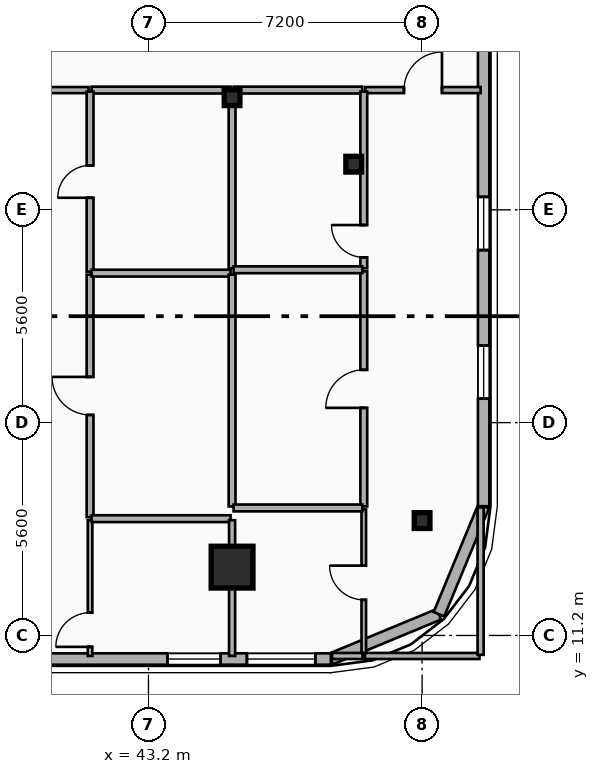
"""IFC4 building model, lengths in metres.
Left out: names, types, materials, properties, quantities, classifications, styles, units other than length and angle.
Written with IfcOpenShell. Run it as: python <this file> out.ifc"""

import sys

from ifc_helpers import new_model, si_unit, direction, frame, frame_2d, origin, origin_2d, place, context, subcontext, project, spatial, rectangle, i_section, extrude, element, fill, save


model = new_model("IFC4")
c1 = context("Model", 3, precision=1e-05, world=origin(), true_north=direction((0.0, 1.0)))
c2 = subcontext(c1, "Body", "Model", "MODEL_VIEW")
j1 = project(units=[si_unit("LENGTHUNIT", "METRE"), si_unit("PLANEANGLEUNIT", "RADIAN")], contexts=[c1])
p1 = place(None, origin())
s1 = spatial("IfcSite", under=j1, at=p1, CompositionType="ELEMENT")
p2 = place(p1, origin())
s2 = spatial("IfcBuilding", under=s1, at=p2, CompositionType="ELEMENT")
p3 = place(p2, frame((0.0, 0.0, 144.8)))
s3 = spatial("IfcBuildingStorey", under=s2, at=p3, CompositionType="ELEMENT", Elevation=144.8)
p4 = place(p3, frame((45.4, 25.35, 0.0), z_axis=(0.0, 0.0, 1.0), x_axis=(1.0, 0.0, 0.0)))
e1 = element("IfcColumn", 1, at=p4, inside=s3, PredefinedType="COLUMN", context=c2, shape_type="SweptSolid", body=[
    extrude(i_section(OverallWidth=0.413, OverallDepth=0.415, WebThickness=0.03, FlangeThickness=0.047, FilletRadius=0.015, at=origin_2d()), origin(), (0.0, 0.0, 1.0), 3.55),
])
p5 = place(p3, frame((45.4, 13.106, 0.0), z_axis=(0.0, -0.0902702026, 0.995917311087), x_axis=(1.0, 0.0, 0.0)))
e2 = element("IfcColumn", 2, at=p5, inside=s3, PredefinedType="COLUMN", context=c2, shape_type="SweptSolid", body=[
    extrude(rectangle(XDim=1.1, YDim=1.1, at=origin_2d()), origin(), (0.0, 0.0, 1.0), 3.565),
])
p6 = place(p3, frame((48.6, 23.6, 0.0), z_axis=(0.0, 0.0, 1.0), x_axis=(1.0, 0.0, 0.0)))
e3 = element("IfcColumn", 3, at=p6, inside=s3, PredefinedType="COLUMN", context=c2, shape_type="SweptSolid", body=[
    extrude(i_section(OverallWidth=0.413, OverallDepth=0.415, WebThickness=0.03, FlangeThickness=0.047, FilletRadius=0.015, at=origin_2d()), origin(), (0.0, 0.0, 1.0), 3.55),
])
p7 = place(p3, frame((50.4, 14.319, 0.0), z_axis=(0.0, -0.079862380324, 0.996805898964), x_axis=(1.0, 0.0, 0.0)))
e4 = element("IfcColumn", 4, at=p7, inside=s3, PredefinedType="COLUMN", context=c2, shape_type="SweptSolid", body=[
    extrude(i_section(OverallWidth=0.413, OverallDepth=0.415, WebThickness=0.03, FlangeThickness=0.047, FilletRadius=0.015, at=origin_2d()), origin(), (0.0, 0.0, 1.0), 3.562),
])
p8 = place(p3, frame((50.843, 11.757, 0.0), z_axis=(0.0, 0.0, 1.0), x_axis=(-0.92389884758, -0.382636798336, 0.0)))
e5 = element("IfcWall", 5, at=p8, inside=s3, PredefinedType="SOLIDWALL", context=c2, shape_type="SweptSolid", body=[
    extrude(rectangle(XDim=3.077, YDim=0.3, at=frame_2d((1.538, 0.0))), origin(), (0.0, 0.0, 1.0), 3.29),
])
p9 = place(p3, frame((52.02, 14.6, 0.0), z_axis=(0.0, 0.0, 1.0), x_axis=(-0.382676475685, -0.923882414032, 0.0)))
e6 = element("IfcWall", 6, at=p9, inside=s3, PredefinedType="SOLIDWALL", context=c2, shape_type="SweptSolid", body=[
    extrude(rectangle(XDim=3.077, YDim=0.3, at=frame_2d((1.539, 0.0))), origin(), (0.0, 0.0, 1.0), 3.29),
])
p10 = place(p3, frame((52.02, 37.6, 0.0), z_axis=(0.0, 0.0, 1.0), x_axis=(0.0, -1.0, 0.0)))
e7 = element("IfcWall", 7, at=p10, inside=s3, PredefinedType="SOLIDWALL", context=c2, shape_type="SweptSolid", body=[
    extrude(rectangle(XDim=23.0, YDim=0.3, at=frame_2d((11.5, 0.0))), origin(), (0.0, 0.0, 1.0), 3.29),
])
p11 = place(p10, frame((2.513, 0.0, 0.34)))
e8 = element("IfcOpeningElement", 8, at=p11, cuts=e7, PredefinedType="OPENING", context=c2, shape_type="SweptSolid", body=[
    extrude(rectangle(XDim=1.4, YDim=2.1, at=frame_2d((0.7, 1.05))), frame((0.0, 0.16, 0.0), z_axis=(0.0, -1.0, 0.0), x_axis=(1.0, 0.0, 0.0)), (0.0, 0.0, 1.0), 0.32),
])
p12 = place(p10, frame((6.107, 0.0, 0.34)))
e9 = element("IfcOpeningElement", 9, at=p12, cuts=e7, PredefinedType="OPENING", context=c2, shape_type="SweptSolid", body=[
    extrude(rectangle(XDim=1.4, YDim=2.1, at=frame_2d((0.7, 1.05))), frame((0.0, 0.16, 0.0), z_axis=(0.0, -1.0, 0.0), x_axis=(1.0, 0.0, 0.0)), (0.0, 0.0, 1.0), 0.32),
])
p13 = place(p10, frame((14.86, 0.0, 0.34)))
e10 = element("IfcOpeningElement", 10, at=p13, cuts=e7, PredefinedType="OPENING", context=c2, shape_type="SweptSolid", body=[
    extrude(rectangle(XDim=1.4, YDim=2.1, at=frame_2d((0.7, 1.05))), frame((0.0, 0.16, 0.0), z_axis=(0.0, -1.0, 0.0), x_axis=(1.0, 0.0, 0.0)), (0.0, 0.0, 1.0), 0.32),
])
p14 = place(p10, frame((18.77, 0.0, 0.34)))
e11 = element("IfcOpeningElement", 11, at=p14, cuts=e7, PredefinedType="OPENING", context=c2, shape_type="SweptSolid", body=[
    extrude(rectangle(XDim=1.4, YDim=2.1, at=frame_2d((0.7, 1.05))), frame((0.0, 0.16, 0.0), z_axis=(0.0, -1.0, 0.0), x_axis=(1.0, 0.0, 0.0)), (0.0, 0.0, 1.0), 0.32),
])
p15 = place(p3, frame((48.0, 10.58, 0.0), z_axis=(0.0, 0.0, 1.0), x_axis=(-1.0, 0.0, 0.0)))
e12 = element("IfcWall", 12, at=p15, inside=s3, PredefinedType="SOLIDWALL", context=c2, shape_type="SweptSolid", body=[
    extrude(rectangle(XDim=38.4, YDim=0.3, at=frame_2d((19.2, 0.0))), origin(), (0.0, 0.0, 1.0), 3.29),
])
p16 = place(p15, frame((36.19, 0.0, 0.34)))
e13 = element("IfcOpeningElement", 13, at=p16, cuts=e12, PredefinedType="OPENING", context=c2, shape_type="SweptSolid", body=[
    extrude(rectangle(XDim=1.8, YDim=1.8, at=frame_2d((0.9, 0.9))), frame((0.0, 0.16, 0.0), z_axis=(0.0, -1.0, 0.0), x_axis=(1.0, 0.0, 0.0)), (0.0, 0.0, 1.0), 0.32),
])
p17 = place(p15, frame((27.938, 0.0, 0.34)))
e14 = element("IfcOpeningElement", 14, at=p17, cuts=e12, PredefinedType="OPENING", context=c2, shape_type="SweptSolid", body=[
    extrude(rectangle(XDim=1.2, YDim=1.5, at=frame_2d((0.6, 0.75))), frame((0.0, 0.16, 0.0), z_axis=(0.0, -1.0, 0.0), x_axis=(1.0, 0.0, 0.0)), (0.0, 0.0, 1.0), 0.32),
])
p18 = place(p15, frame((25.719, 0.0, 0.34)))
e15 = element("IfcOpeningElement", 15, at=p18, cuts=e12, PredefinedType="OPENING", context=c2, shape_type="SweptSolid", body=[
    extrude(rectangle(XDim=1.4, YDim=1.8, at=frame_2d((0.7, 0.9))), frame((0.0, 0.16, 0.0), z_axis=(0.0, -1.0, 0.0), x_axis=(1.0, 0.0, 0.0)), (0.0, 0.0, 1.0), 0.32),
])
p19 = place(p15, frame((33.861, 0.0, 1.22)))
e16 = element("IfcOpeningElement", 16, at=p19, cuts=e12, PredefinedType="OPENING", context=c2, shape_type="SweptSolid", body=[
    extrude(rectangle(XDim=1.2, YDim=1.5, at=frame_2d((0.6, 0.75))), frame((0.0, 0.16, 0.0), z_axis=(0.0, -1.0, 0.0), x_axis=(1.0, 0.0, 0.0)), (0.0, 0.0, 1.0), 0.32),
])
p20 = place(p15, frame((20.1, 0.0, 0.65)))
e17 = element("IfcOpeningElement", 17, at=p20, cuts=e12, PredefinedType="OPENING", context=c2, shape_type="SweptSolid", body=[
    extrude(rectangle(XDim=2.1, YDim=2.1, at=frame_2d((1.05, 1.05))), frame((0.0, 0.16, 0.0), z_axis=(0.0, -1.0, 0.0), x_axis=(1.0, 0.0, 0.0)), (0.0, 0.0, 1.0), 0.32),
])
p21 = place(p15, frame((22.95, 0.0, 0.8)))
e18 = element("IfcOpeningElement", 18, at=p21, cuts=e12, PredefinedType="OPENING", context=c2, shape_type="SweptSolid", body=[
    extrude(rectangle(XDim=1.8, YDim=1.8, at=frame_2d((0.9, 0.9))), frame((0.0, 0.16, 0.0), z_axis=(0.0, -1.0, 0.0), x_axis=(1.0, 0.0, 0.0)), (0.0, 0.0, 1.0), 0.32),
])
p22 = place(p15, frame((13.35, 0.0, 0.65)))
e19 = element("IfcOpeningElement", 19, at=p22, cuts=e12, PredefinedType="OPENING", context=c2, shape_type="SweptSolid", body=[
    extrude(rectangle(XDim=2.1, YDim=2.1, at=frame_2d((1.05, 1.05))), frame((0.0, 0.16, 0.0), z_axis=(0.0, -1.0, 0.0), x_axis=(1.0, 0.0, 0.0)), (0.0, 0.0, 1.0), 0.32),
])
p23 = place(p15, frame((8.25, 0.0, 1.68)))
e20 = element("IfcOpeningElement", 20, at=p23, cuts=e12, PredefinedType="OPENING", context=c2, shape_type="SweptSolid", body=[
    extrude(rectangle(XDim=1.1, YDim=1.05, at=frame_2d((0.55, 0.525))), frame((0.0, 0.16, 0.0), z_axis=(0.0, -1.0, 0.0), x_axis=(1.0, 0.0, 0.0)), (0.0, 0.0, 1.0), 0.32),
])
p24 = place(p15, frame((2.9, 0.0, 0.34)))
e21 = element("IfcOpeningElement", 21, at=p24, cuts=e12, PredefinedType="OPENING", context=c2, shape_type="SweptSolid", body=[
    extrude(rectangle(XDim=1.4, YDim=1.8, at=frame_2d((0.7, 0.9))), frame((0.0, 0.16, 0.0), z_axis=(0.0, -1.0, 0.0), x_axis=(1.0, 0.0, 0.0)), (0.0, 0.0, 1.0), 0.32),
])
p25 = place(p15, frame((0.41, 0.0, 0.34)))
e22 = element("IfcOpeningElement", 22, at=p25, cuts=e12, PredefinedType="OPENING", context=c2, shape_type="SweptSolid", body=[
    extrude(rectangle(XDim=1.8, YDim=1.8, at=frame_2d((0.9, 0.9))), frame((0.0, 0.16, 0.0), z_axis=(0.0, -1.0, 0.0), x_axis=(1.0, 0.0, 0.0)), (0.0, 0.0, 1.0), 0.32),
])
p26 = place(p3, frame((38.39, 25.55, 0.0), z_axis=(0.0, 0.0, 1.0), x_axis=(1.0, 0.0, 0.0)))
e23 = element("IfcWall", 23, at=p26, inside=s3, PredefinedType="PARTITIONING", context=c2, shape_type="SweptSolid", body=[
    extrude(rectangle(XDim=3.233, YDim=0.16, at=frame_2d((1.617, 0.0))), origin(), (0.0, 0.0, 1.0), 3.29),
])
p27 = place(p26, frame((1.116, 0.0, 0.0)))
e24 = element("IfcOpeningElement", 24, at=p27, cuts=e23, PredefinedType="OPENING", context=c2, shape_type="SweptSolid", body=[
    extrude(rectangle(XDim=1.0, YDim=2.15, at=frame_2d((0.5, 1.075))), frame((0.0, 0.09, 0.0), z_axis=(0.0, -1.0, 0.0), x_axis=(1.0, 0.0, 0.0)), (0.0, 0.0, 1.0), 0.18),
])
p28 = place(p3, frame((41.703, 25.55, 0.0), z_axis=(0.0, 0.0, 1.0), x_axis=(1.0, 0.0, 0.0)))
e25 = element("IfcWall", 25, at=p28, inside=s3, PredefinedType="PLUMBINGWALL", context=c2, shape_type="SweptSolid", body=[
    extrude(rectangle(XDim=3.657, YDim=0.18, at=frame_2d((1.829, 0.0))), origin(), (0.0, 0.0, 1.0), 2.36),
])
p29 = place(p3, frame((48.906, 25.55, 0.0), z_axis=(0.0, 0.0, 1.0), x_axis=(1.0, 0.0, 0.0)))
e26 = element("IfcWall", 26, at=p29, inside=s3, PredefinedType="PARTITIONING", context=c2, shape_type="SweptSolid", body=[
    extrude(rectangle(XDim=3.034, YDim=0.16, at=frame_2d((1.517, 0.0))), origin(), (0.0, 0.0, 1.0), 2.62),
])
p30 = place(p29, frame((1.017, 0.0, 0.0)))
e27 = element("IfcOpeningElement", 27, at=p30, cuts=e26, PredefinedType="OPENING", context=c2, shape_type="SweptSolid", body=[
    extrude(rectangle(XDim=1.0, YDim=2.15, at=frame_2d((0.5, 1.075))), frame((0.0, 0.09, 0.0), z_axis=(0.0, -1.0, 0.0), x_axis=(1.0, 0.0, 0.0)), (0.0, 0.0, 1.0), 0.18),
])
p31 = place(p3, frame((45.44, 25.55, 0.0), z_axis=(0.0, 0.0, 1.0), x_axis=(1.0, 0.0, 0.0)))
e28 = element("IfcWall", 28, at=p31, inside=s3, PredefinedType="PLUMBINGWALL", context=c2, shape_type="SweptSolid", body=[
    extrude(rectangle(XDim=3.386, YDim=0.18, at=frame_2d((1.693, 0.0))), origin(), (0.0, 0.0, 1.0), 2.36),
])
p32 = place(p3, frame((41.663, 10.66, 0.0), z_axis=(0.0, 0.0, 1.0), x_axis=(0.0, 1.0, 0.0)))
e29 = element("IfcWall", 29, at=p32, inside=s3, PredefinedType="PARTITIONING", context=c2, shape_type="SweptSolid", body=[
    extrude(rectangle(XDim=3.573, YDim=0.12, at=frame_2d((1.787, 0.0))), origin(), (0.0, 0.0, 1.0), 2.91),
])
p33 = place(p32, frame((0.24, 0.0, 0.0)))
e30 = element("IfcOpeningElement", 30, at=p33, cuts=e29, PredefinedType="OPENING", context=c2, shape_type="SweptSolid", body=[
    extrude(rectangle(XDim=0.9, YDim=2.1, at=frame_2d((0.45, 1.05))), frame((0.0, 0.07, 0.0), z_axis=(0.0, -1.0, 0.0), x_axis=(1.0, 0.0, 0.0)), (0.0, 0.0, 1.0), 0.14),
])
p34 = place(p3, frame((41.663, 14.313, 0.0), z_axis=(0.0, 0.0, 1.0), x_axis=(0.0, 1.0, 0.0)))
e31 = element("IfcWall", 31, at=p34, inside=s3, PredefinedType="PLUMBINGWALL", context=c2, shape_type="SweptSolid", body=[
    extrude(rectangle(XDim=6.38, YDim=0.18, at=frame_2d((3.19, 0.0))), origin(), (0.0, 0.0, 1.0), 2.72),
])
p35 = place(p34, frame((2.69, 0.0, 0.0)))
e32 = element("IfcOpeningElement", 32, at=p35, cuts=e31, PredefinedType="OPENING", context=c2, shape_type="SweptSolid", body=[
    extrude(rectangle(XDim=1.0, YDim=2.15, at=frame_2d((0.5, 1.075))), frame((0.0, 0.1, 0.0), z_axis=(0.0, -1.0, 0.0), x_axis=(1.0, 0.0, 0.0)), (0.0, 0.0, 1.0), 0.2),
])
p36 = place(p3, frame((41.663, 20.773, 0.0), z_axis=(0.0, 0.0, 1.0), x_axis=(0.0, 1.0, 0.0)))
e33 = element("IfcWall", 33, at=p36, inside=s3, PredefinedType="PLUMBINGWALL", context=c2, shape_type="SweptSolid", body=[
    extrude(rectangle(XDim=4.737, YDim=0.18, at=frame_2d((2.369, 0.0))), origin(), (0.0, 0.0, 1.0), 2.88),
])
p37 = place(p36, frame((1.944, 0.0, 0.0)))
e34 = element("IfcOpeningElement", 34, at=p37, cuts=e33, PredefinedType="OPENING", context=c2, shape_type="SweptSolid", body=[
    extrude(rectangle(XDim=0.85, YDim=2.1, at=frame_2d((0.425, 1.05))), frame((0.0, 0.1, 0.0), z_axis=(0.0, -1.0, 0.0), x_axis=(1.0, 0.0, 0.0)), (0.0, 0.0, 1.0), 0.2),
])
p38 = place(p3, frame((41.703, 14.273, 0.0), z_axis=(0.0, 0.0, 1.0), x_axis=(1.0, 0.0, 0.0)))
e35 = element("IfcWall", 35, at=p38, inside=s3, PredefinedType="PLUMBINGWALL", context=c2, shape_type="SweptSolid", body=[
    extrude(rectangle(XDim=3.657, YDim=0.18, at=frame_2d((1.829, 0.0))), origin(), (0.0, 0.0, 1.0), 2.36),
])
p39 = place(p3, frame((45.4, 10.66, 0.0), z_axis=(0.0, 0.0, 1.0), x_axis=(0.0, 1.0, 0.0)))
e36 = element("IfcWall", 36, at=p39, inside=s3, PredefinedType="PARTITIONING", context=c2, shape_type="SweptSolid", body=[
    extrude(rectangle(XDim=3.573, YDim=0.16, at=frame_2d((1.787, 0.0))), origin(), (0.0, 0.0, 1.0), 2.36),
])
p40 = place(p3, frame((41.703, 20.733, 0.0), z_axis=(0.0, 0.0, 1.0), x_axis=(1.0, 0.0, 0.0)))
e37 = element("IfcWall", 37, at=p40, inside=s3, PredefinedType="PLUMBINGWALL", context=c2, shape_type="SweptSolid", body=[
    extrude(rectangle(XDim=3.657, YDim=0.18, at=frame_2d((1.829, 0.0))), origin(), (0.0, 0.0, 1.0), 2.36),
])
p41 = place(p3, frame((45.4, 14.595, 0.0), z_axis=(0.0, 0.0, 1.0), x_axis=(0.0, 1.0, 0.0)))
e38 = element("IfcWall", 38, at=p41, inside=s3, PredefinedType="PLUMBINGWALL", context=c2, shape_type="SweptSolid", body=[
    extrude(rectangle(XDim=6.098, YDim=0.18, at=frame_2d((3.049, 0.0))), origin(), (0.0, 0.0, 1.0), 2.36),
])
p42 = place(p3, frame((45.4, 20.862, 0.0), z_axis=(0.0, 0.0, 1.0), x_axis=(0.0, 1.0, 0.0)))
e39 = element("IfcWall", 39, at=p42, inside=s3, PredefinedType="PLUMBINGWALL", context=c2, shape_type="SweptSolid", body=[
    extrude(rectangle(XDim=4.648, YDim=0.18, at=frame_2d((2.324, 0.0))), origin(), (0.0, 0.0, 1.0), 2.36),
])
p43 = place(p3, frame((48.866, 10.66, 0.0), z_axis=(0.0, 0.0, 1.0), x_axis=(0.0, 1.0, 0.0)))
e40 = element("IfcWall", 40, at=p43, inside=s3, PredefinedType="PARTITIONING", context=c2, shape_type="SweptSolid", body=[
    extrude(rectangle(XDim=3.855, YDim=0.12, at=frame_2d((1.927, 0.0))), origin(), (0.0, 0.0, 1.0), 2.77),
])
p44 = place(p43, frame((1.478, 0.0, 0.0)))
e41 = element("IfcOpeningElement", 41, at=p44, cuts=e40, PredefinedType="OPENING", context=c2, shape_type="SweptSolid", body=[
    extrude(rectangle(XDim=0.9, YDim=2.1, at=frame_2d((0.45, 1.05))), frame((0.0, 0.07, 0.0), z_axis=(0.0, -1.0, 0.0), x_axis=(1.0, 0.0, 0.0)), (0.0, 0.0, 1.0), 0.14),
])
p45 = place(p3, frame((48.866, 14.595, 0.0), z_axis=(0.0, 0.0, 1.0), x_axis=(0.0, 1.0, 0.0)))
e42 = element("IfcWall", 42, at=p45, inside=s3, PredefinedType="PLUMBINGWALL", context=c2, shape_type="SweptSolid", body=[
    extrude(rectangle(XDim=6.187, YDim=0.18, at=frame_2d((3.094, 0.0))), origin(), (0.0, 0.0, 1.0), 2.77),
])
p46 = place(p45, frame((2.594, 0.0, 0.0)))
e43 = element("IfcOpeningElement", 43, at=p46, cuts=e42, PredefinedType="OPENING", context=c2, shape_type="SweptSolid", body=[
    extrude(rectangle(XDim=1.0, YDim=2.15, at=frame_2d((0.5, 1.075))), frame((0.0, 0.1, 0.0), z_axis=(0.0, -1.0, 0.0), x_axis=(1.0, 0.0, 0.0)), (0.0, 0.0, 1.0), 0.2),
])
p47 = place(p3, frame((48.866, 20.862, 0.0), z_axis=(0.0, 0.0, 1.0), x_axis=(0.0, 1.0, 0.0)))
e44 = element("IfcWall", 44, at=p47, inside=s3, PredefinedType="PLUMBINGWALL", context=c2, shape_type="SweptSolid", body=[
    extrude(rectangle(XDim=4.648, YDim=0.18, at=frame_2d((2.324, 0.0))), origin(), (0.0, 0.0, 1.0), 2.77),
])
p48 = place(p47, frame((0.287, 0.0, 0.0)))
e45 = element("IfcOpeningElement", 45, at=p48, cuts=e44, PredefinedType="OPENING", context=c2, shape_type="SweptSolid", body=[
    extrude(rectangle(XDim=0.85, YDim=2.1, at=frame_2d((0.425, 1.05))), frame((0.0, 0.1, 0.0), z_axis=(0.0, -1.0, 0.0), x_axis=(1.0, 0.0, 0.0)), (0.0, 0.0, 1.0), 0.2),
])
for number, where, z_axis, x_axis in (
    (46, (45.44, 14.555, 0.0), (0.0, 0.0, 1.0), (1.0, 0.0, 0.0)),
    (47, (45.44, 20.822, 0.0), (0.0, 0.0, 1.0), (1.0, 0.0, 0.0)),
):
    element("IfcWall", number, at=place(p3, frame(where, z_axis=z_axis, x_axis=x_axis)), inside=s3, PredefinedType="PLUMBINGWALL", context=c2, shape_type="SweptSolid", body=[
        extrude(rectangle(XDim=3.386, YDim=0.18, at=frame_2d((1.693, 0.0))), origin(), (0.0, 0.0, 1.0), 2.36),
    ])
p49 = place(p3, frame((48.896, 10.66, 0.0), z_axis=(0.0, 0.0, 1.0), x_axis=(1.0, 0.0, 0.0)))
e48 = element("IfcWall", 48, at=p49, inside=s3, PredefinedType="PARTITIONING", context=c2, shape_type="SweptSolid", body=[
    extrude(rectangle(XDim=3.014, YDim=0.16, at=frame_2d((1.507, 0.0))), origin(), (0.0, 0.0, 1.0), 3.29),
])
p50 = place(p3, frame((51.94, 10.69, 0.0), z_axis=(0.0, 0.0, 1.0), x_axis=(0.0, 1.0, 0.0)))
e49 = element("IfcWall", 49, at=p50, inside=s3, PredefinedType="PARTITIONING", context=c2, shape_type="SweptSolid", body=[
    extrude(rectangle(XDim=3.88, YDim=0.16, at=frame_2d((1.94, 0.0))), origin(), (0.0, 0.0, 1.0), 3.29),
])
p51 = place(p3, frame((48.03, 10.66, 0.0), z_axis=(0.0, 0.0, 1.0), x_axis=(1.0, 0.0, 0.0)))
e50 = element("IfcWall", 50, at=p51, inside=s3, PredefinedType="PARTITIONING", context=c2, shape_type="SweptSolid", body=[
    extrude(rectangle(XDim=0.806, YDim=0.16, at=frame_2d((0.403, 0.0))), origin(), (0.0, 0.0, 1.0), 3.29),
])
p52 = place(p13, origin())
e51 = element("IfcWindow", 51, at=p52, inside=s3, PartitioningType="SINGLE_PANEL", PredefinedType="WINDOW", context=c2, shape_type="SweptSolid", body=[
    extrude(rectangle(XDim=1.4, YDim=2.1, at=frame_2d((0.7, 1.05))), frame((0.0, 0.03, 0.0), z_axis=(0.0, -1.0, 0.0), x_axis=(1.0, 0.0, 0.0)), (0.0, 0.0, 1.0), 0.06),
])
fill(e10, e51)
p53 = place(p14, origin())
e52 = element("IfcWindow", 52, at=p53, inside=s3, PartitioningType="SINGLE_PANEL", PredefinedType="WINDOW", context=c2, shape_type="SweptSolid", body=[
    extrude(rectangle(XDim=1.4, YDim=2.1, at=frame_2d((0.7, 1.05))), frame((0.0, 0.03, 0.0), z_axis=(0.0, -1.0, 0.0), x_axis=(1.0, 0.0, 0.0)), (0.0, 0.0, 1.0), 0.06),
])
fill(e11, e52)
p54 = place(p24, origin())
e53 = element("IfcWindow", 53, at=p54, inside=s3, PartitioningType="SINGLE_PANEL", PredefinedType="WINDOW", context=c2, shape_type="SweptSolid", body=[
    extrude(rectangle(XDim=1.4, YDim=1.8, at=frame_2d((0.7, 0.9))), frame((0.0, 0.03, 0.0), z_axis=(0.0, -1.0, 0.0), x_axis=(1.0, 0.0, 0.0)), (0.0, 0.0, 1.0), 0.06),
])
fill(e21, e53)
p55 = place(p25, origin())
e54 = element("IfcWindow", 54, at=p55, inside=s3, PartitioningType="SINGLE_PANEL", PredefinedType="WINDOW", context=c2, shape_type="SweptSolid", body=[
    extrude(rectangle(XDim=1.8, YDim=1.8, at=frame_2d((0.9, 0.9))), frame((0.0, 0.03, 0.0), z_axis=(0.0, -1.0, 0.0), x_axis=(1.0, 0.0, 0.0)), (0.0, 0.0, 1.0), 0.06),
])
fill(e22, e54)
p56 = place(p30, origin())
e55 = element("IfcDoor", 55, at=p56, inside=s3, OperationType="SINGLE_SWING_RIGHT", PredefinedType="DOOR", context=c2, shape_type="SweptSolid", body=[
    extrude(rectangle(XDim=1.0, YDim=2.15, at=frame_2d((0.5, 1.075))), frame((0.0, 0.025, 0.0), z_axis=(0.0, -1.0, 0.0), x_axis=(1.0, 0.0, 0.0)), (0.0, 0.0, 1.0), 0.05),
])
fill(e27, e55)
p57 = place(p33, origin())
e56 = element("IfcDoor", 56, at=p57, inside=s3, OperationType="SINGLE_SWING_LEFT", PredefinedType="DOOR", context=c2, shape_type="SweptSolid", body=[
    extrude(rectangle(XDim=0.9, YDim=2.1, at=frame_2d((0.45, 1.05))), frame((0.0, 0.025, 0.0), z_axis=(0.0, -1.0, 0.0), x_axis=(1.0, 0.0, 0.0)), (0.0, 0.0, 1.0), 0.05),
])
fill(e30, e56)
p58 = place(p35, origin())
e57 = element("IfcDoor", 57, at=p58, inside=s3, OperationType="SINGLE_SWING_RIGHT", PredefinedType="DOOR", context=c2, shape_type="SweptSolid", body=[
    extrude(rectangle(XDim=1.0, YDim=2.15, at=frame_2d((0.5, 1.075))), frame((0.0, 0.025, 0.0), z_axis=(0.0, -1.0, 0.0), x_axis=(1.0, 0.0, 0.0)), (0.0, 0.0, 1.0), 0.05),
])
fill(e32, e57)
p59 = place(p37, origin())
e58 = element("IfcDoor", 58, at=p59, inside=s3, OperationType="SINGLE_SWING_LEFT", PredefinedType="DOOR", context=c2, shape_type="SweptSolid", body=[
    extrude(rectangle(XDim=0.85, YDim=2.1, at=frame_2d((0.425, 1.05))), frame((0.0, 0.025, 0.0), z_axis=(0.0, -1.0, 0.0), x_axis=(1.0, 0.0, 0.0)), (0.0, 0.0, 1.0), 0.05),
])
fill(e34, e58)
p60 = place(p44, origin())
e59 = element("IfcDoor", 59, at=p60, inside=s3, OperationType="SINGLE_SWING_RIGHT", PredefinedType="DOOR", context=c2, shape_type="SweptSolid", body=[
    extrude(rectangle(XDim=0.9, YDim=2.1, at=frame_2d((0.45, 1.05))), frame((0.0, 0.025, 0.0), z_axis=(0.0, -1.0, 0.0), x_axis=(1.0, 0.0, 0.0)), (0.0, 0.0, 1.0), 0.05),
])
fill(e41, e59)
p61 = place(p46, origin())
e60 = element("IfcDoor", 60, at=p61, inside=s3, OperationType="SINGLE_SWING_LEFT", PredefinedType="DOOR", context=c2, shape_type="SweptSolid", body=[
    extrude(rectangle(XDim=1.0, YDim=2.15, at=frame_2d((0.5, 1.075))), frame((0.0, 0.025, 0.0), z_axis=(0.0, -1.0, 0.0), x_axis=(1.0, 0.0, 0.0)), (0.0, 0.0, 1.0), 0.05),
])
fill(e43, e60)
p62 = place(p48, origin())
e61 = element("IfcDoor", 61, at=p62, inside=s3, OperationType="SINGLE_SWING_RIGHT", PredefinedType="DOOR", context=c2, shape_type="SweptSolid", body=[
    extrude(rectangle(XDim=0.85, YDim=2.1, at=frame_2d((0.425, 1.05))), frame((0.0, 0.025, 0.0), z_axis=(0.0, -1.0, 0.0), x_axis=(1.0, 0.0, 0.0)), (0.0, 0.0, 1.0), 0.05),
])
fill(e45, e61)
save(model, sys.argv[1])
